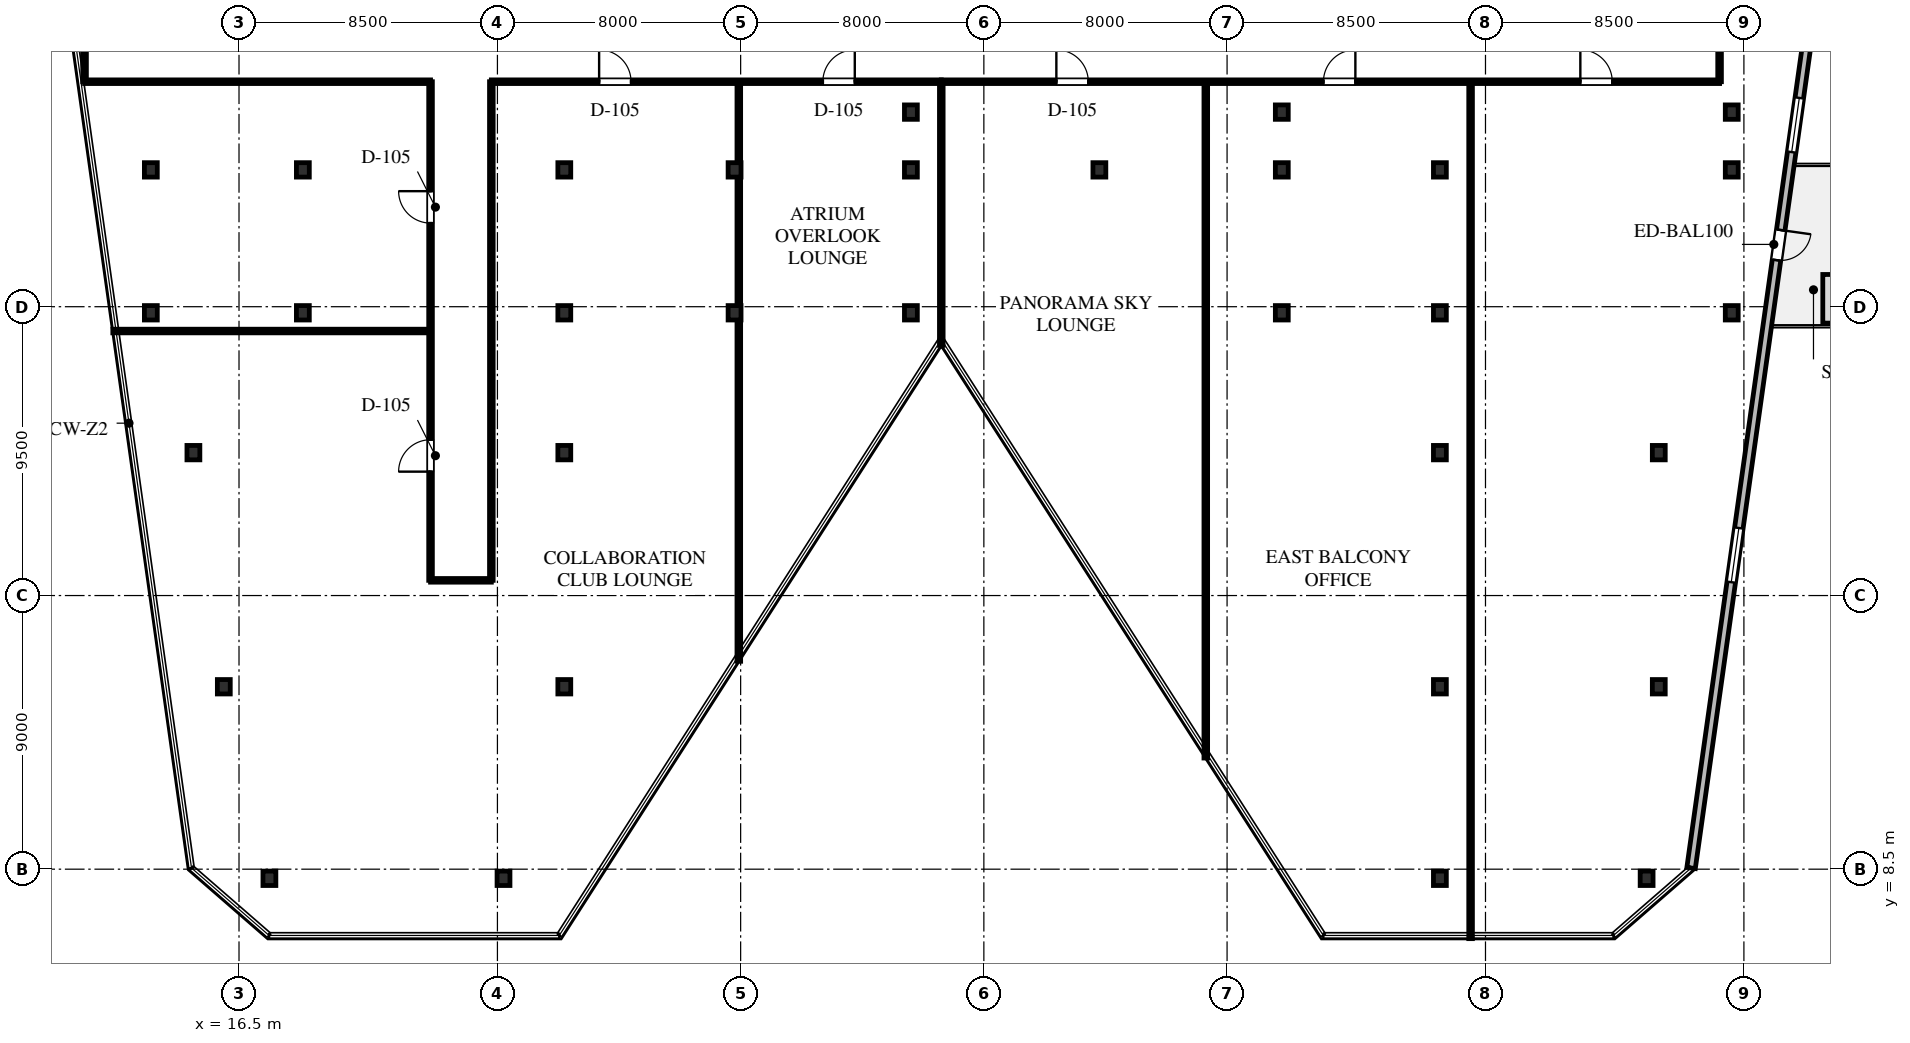
"""IFC4 building model, lengths in metres.
Left out: names, types, materials, properties, quantities, classifications, styles, units other than length and angle.
Written with IfcOpenShell. Run it as: python <this file> out.ifc"""

import sys

from ifc_helpers import new_model, si_unit, direction, frame, frame_2d, origin, origin_2d, place, context, subcontext, project, spatial, rectangle, i_section, extrude, element, fill, save


model = new_model("IFC4")
c1 = context("Model", 3, precision=1e-05, world=origin(), true_north=direction((0.0, 1.0)))
c2 = subcontext(c1, "Body", "Model", "MODEL_VIEW")
j1 = project(units=[si_unit("LENGTHUNIT", "METRE"), si_unit("PLANEANGLEUNIT", "RADIAN")], contexts=[c1])
p1 = place(None, origin())
s1 = spatial("IfcSite", under=j1, at=p1, CompositionType="ELEMENT")
p2 = place(p1, origin())
s2 = spatial("IfcBuilding", under=s1, at=p2, CompositionType="ELEMENT")
p3 = place(p2, frame((0.0, 0.0, 112.0)))
s3 = spatial("IfcBuildingStorey", under=s2, at=p3, CompositionType="ELEMENT", Elevation=112.0)
for number, where, z_axis, x_axis in (
    (1, (17.5, 8.2, 0.0), (0.0, 0.0, 1.0), (1.0, 0.0, 0.0)),
    (2, (13.6, 26.8, 0.0), (0.0, 0.0, 1.0), (1.0, 0.0, 0.0)),
    (3, (18.6, 26.8, 0.0), (0.0, 0.0, 1.0), (1.0, 0.0, 0.0)),
    (4, (27.2, 26.8, 0.0), (0.0, 0.0, 1.0), (1.0, 0.0, 0.0)),
    (5, (32.8, 26.8, 0.0), (0.0, 0.0, 1.0), (1.0, 0.0, 0.0)),
    (6, (38.6, 26.8, 0.0), (0.0, 0.0, 1.0), (1.0, 0.0, 0.0)),
    (7, (50.8, 26.8, 0.0), (0.0, 0.0, 1.0), (1.0, 0.0, 0.0)),
    (8, (56.0, 26.8, 0.0), (0.0, 0.0, 1.0), (1.0, 0.0, 0.0)),
    (9, (65.6, 26.8, 0.0), (0.0, 0.0, 1.0), (1.0, 0.0, 0.0)),
    (10, (13.6, 31.5, 0.0), (0.0, 0.0, 1.0), (1.0, 0.0, 0.0)),
    (11, (18.6, 31.5, 0.0), (0.0, 0.0, 1.0), (1.0, 0.0, 0.0)),
    (12, (27.2, 31.5, 0.0), (0.0, 0.0, 1.0), (1.0, 0.0, 0.0)),
    (13, (25.2, 8.2, 0.0), (0.0, 0.0, 1.0), (1.0, 0.0, 0.0)),
    (14, (32.8, 31.5, 0.0), (0.0, 0.0, 1.0), (1.0, 0.0, 0.0)),
    (15, (38.6, 31.5, 0.0), (0.0, 0.0, 1.0), (1.0, 0.0, 0.0)),
    (16, (44.8, 31.5, 0.0), (0.0, 0.0, 1.0), (1.0, 0.0, 0.0)),
    (17, (50.8, 31.5, 0.0), (0.0, 0.0, 1.0), (1.0, 0.0, 0.0)),
    (18, (56.0, 31.5, 0.0), (0.0, 0.0, 1.0), (1.0, 0.0, 0.0)),
    (19, (65.6, 31.5, 0.0), (0.0, 0.0, 1.0), (1.0, 0.0, 0.0)),
    (20, (56.0, 8.2, 0.0), (0.0, 0.0, 1.0), (1.0, 0.0, 0.0)),
    (21, (62.8, 8.2, 0.0), (0.0, 0.0, 1.0), (1.0, 0.0, 0.0)),
    (22, (16.0, 14.5, 0.0), (0.0, 0.0, 1.0), (1.0, 0.0, 0.0)),
    (23, (27.2, 14.5, 0.0), (0.0, 0.0, 1.0), (1.0, 0.0, 0.0)),
    (24, (56.0, 14.5, 0.0), (0.0, 0.0, 1.0), (1.0, 0.0, 0.0)),
    (25, (63.2, 14.5, 0.0), (0.0, 0.0, 1.0), (1.0, 0.0, 0.0)),
    (26, (15.0, 22.2, 0.0), (0.0, 0.0, 1.0), (1.0, 0.0, 0.0)),
    (27, (27.2, 22.2, 0.0), (0.0, 0.0, 1.0), (1.0, 0.0, 0.0)),
    (28, (56.0, 22.2, 0.0), (0.0, 0.0, 1.0), (1.0, 0.0, 0.0)),
    (29, (63.2, 22.2, 0.0), (0.0, 0.0, 1.0), (1.0, 0.0, 0.0)),
    (30, (38.6, 33.4, 0.0), (0.0, 0.0, 1.0), (1.0, 0.0, 0.0)),
    (31, (50.8, 33.4, 0.0), (0.0, 0.0, 1.0), (1.0, 0.0, 0.0)),
    (32, (65.6, 33.4, 0.0), (0.0, 0.0, 1.0), (1.0, 0.0, 0.0)),
):
    element("IfcColumn", number, at=place(p3, frame(where, z_axis=z_axis, x_axis=x_axis)), inside=s3, PredefinedType="COLUMN", context=c2, shape_type="SweptSolid", body=[
        extrude(i_section(OverallWidth=0.424, OverallDepth=0.474, WebThickness=0.048, FlangeThickness=0.077, FilletRadius=0.03, at=origin_2d()), origin(), (0.0, 0.0, 1.0), 4.0),
    ])
p4 = place(p3, frame((68.375, 37.8, 0.0), z_axis=(0.0, 0.0, 1.0), x_axis=(-0.13917001236, -0.990268502811, 0.0)))
e33 = element("IfcWall", 33, at=p4, inside=s3, PredefinedType="STANDARD", context=c2, shape_type="SweptSolid", body=[
    extrude(rectangle(XDim=29.549, YDim=0.28, at=frame_2d((14.774, 0.0))), origin(), (0.0, 0.0, 1.0), 3.75),
])
p5 = place(p4, frame((8.36, 0.0, 0.0)))
e34 = element("IfcOpeningElement", 34, at=p5, cuts=e33, PredefinedType="OPENING", context=c2, shape_type="SweptSolid", body=[
    extrude(rectangle(XDim=1.0, YDim=2.15, at=frame_2d((0.5, 1.075))), frame((0.0, 0.15, 0.0), z_axis=(0.0, -1.0, 0.0), x_axis=(1.0, 0.0, 0.0)), (0.0, 0.0, 1.0), 0.3),
])
p6 = place(p4, frame((3.971, 0.0, 0.65)))
e35 = element("IfcOpeningElement", 35, at=p6, cuts=e33, PredefinedType="OPENING", context=c2, shape_type="SweptSolid", body=[
    extrude(rectangle(XDim=1.8, YDim=2.1, at=frame_2d((0.9, 1.05))), frame((0.0, 0.15, 0.0), z_axis=(0.0, -1.0, 0.0), x_axis=(1.0, 0.0, 0.0)), (0.0, 0.0, 1.0), 0.3),
])
p7 = place(p4, frame((18.256, 0.0, 0.65)))
e36 = element("IfcOpeningElement", 36, at=p7, cuts=e33, PredefinedType="OPENING", context=c2, shape_type="SweptSolid", body=[
    extrude(rectangle(XDim=1.8, YDim=2.1, at=frame_2d((0.9, 1.05))), frame((0.0, 0.15, 0.0), z_axis=(0.0, -1.0, 0.0), x_axis=(1.0, 0.0, 0.0)), (0.0, 0.0, 1.0), 0.3),
])
p8 = place(p3, frame((11.42, 34.4, 0.0), z_axis=(0.0, 0.0, 1.0), x_axis=(1.0, 0.0, 0.0)))
e37 = element("IfcWall", 37, at=p8, inside=s3, PredefinedType="PARTITIONING", context=c2, shape_type="SweptSolid", body=[
    extrude(rectangle(XDim=11.38, YDim=0.12, at=frame_2d((5.69, 0.0))), origin(), (0.0, 0.0, 1.0), 2.894),
])
p9 = place(p3, frame((24.8, 34.4, 0.0), z_axis=(0.0, 0.0, 1.0), x_axis=(1.0, 0.0, 0.0)))
e38 = element("IfcWall", 38, at=p9, inside=s3, PredefinedType="PARTITIONING", context=c2, shape_type="SweptSolid", body=[
    extrude(rectangle(XDim=14.8, YDim=0.12, at=frame_2d((7.4, 0.0))), origin(), (0.0, 0.0, 1.0), 2.894),
])
p10 = place(p9, frame((3.545, 0.0, 0.0)))
e39 = element("IfcOpeningElement", 39, at=p10, cuts=e38, PredefinedType="OPENING", context=c2, shape_type="SweptSolid", body=[
    extrude(rectangle(XDim=1.05, YDim=2.2, at=frame_2d((0.525, 1.1))), frame((0.0, 0.07, 0.0), z_axis=(0.0, -1.0, 0.0), x_axis=(1.0, 0.0, 0.0)), (0.0, 0.0, 1.0), 0.14),
])
p11 = place(p9, frame((10.904, 0.0, 0.0)))
e40 = element("IfcOpeningElement", 40, at=p11, cuts=e38, PredefinedType="OPENING", context=c2, shape_type="SweptSolid", body=[
    extrude(rectangle(XDim=1.05, YDim=2.2, at=frame_2d((0.525, 1.1))), frame((0.0, 0.07, 0.0), z_axis=(0.0, -1.0, 0.0), x_axis=(1.0, 0.0, 0.0)), (0.0, 0.0, 1.0), 0.14),
])
p12 = place(p3, frame((39.6, 34.4, 0.0), z_axis=(0.0, 0.0, 1.0), x_axis=(1.0, 0.0, 0.0)))
e41 = element("IfcWall", 41, at=p12, inside=s3, PredefinedType="PARTITIONING", context=c2, shape_type="SweptSolid", body=[
    extrude(rectangle(XDim=25.6, YDim=0.12, at=frame_2d((12.8, 0.0))), origin(), (0.0, 0.0, 1.0), 2.894),
])
p13 = place(p12, frame((3.785, 0.0, 0.0)))
e42 = element("IfcOpeningElement", 42, at=p13, cuts=e41, PredefinedType="OPENING", context=c2, shape_type="SweptSolid", body=[
    extrude(rectangle(XDim=1.05, YDim=2.2, at=frame_2d((0.525, 1.1))), frame((0.0, 0.07, 0.0), z_axis=(0.0, -1.0, 0.0), x_axis=(1.0, 0.0, 0.0)), (0.0, 0.0, 1.0), 0.14),
])
p14 = place(p12, frame((12.57, 0.0, 0.0)))
e43 = element("IfcOpeningElement", 43, at=p14, cuts=e41, PredefinedType="OPENING", context=c2, shape_type="SweptSolid", body=[
    extrude(rectangle(XDim=1.05, YDim=2.2, at=frame_2d((0.525, 1.1))), frame((0.0, 0.07, 0.0), z_axis=(0.0, -1.0, 0.0), x_axis=(1.0, 0.0, 0.0)), (0.0, 0.0, 1.0), 0.14),
])
p15 = place(p12, frame((21.02, 0.0, 0.0)))
e44 = element("IfcOpeningElement", 44, at=p15, cuts=e41, PredefinedType="OPENING", context=c2, shape_type="SweptSolid", body=[
    extrude(rectangle(XDim=1.05, YDim=2.2, at=frame_2d((0.525, 1.1))), frame((0.0, 0.07, 0.0), z_axis=(0.0, -1.0, 0.0), x_axis=(1.0, 0.0, 0.0)), (0.0, 0.0, 1.0), 0.14),
])
p16 = place(p3, frame((11.42, 34.4, 0.0), z_axis=(0.0, 0.0, 1.0), x_axis=(0.0, 1.0, 0.0)))
e45 = element("IfcWall", 45, at=p16, inside=s3, PredefinedType="PARTITIONING", context=c2, shape_type="SweptSolid", body=[
    extrude(rectangle(XDim=3.65, YDim=0.12, at=frame_2d((1.825, 0.0))), origin(), (0.0, 0.0, 1.0), 3.75),
])
p17 = place(p3, frame((65.2, 34.4, 0.0), z_axis=(0.0, 0.0, 1.0), x_axis=(0.0, 1.0, 0.0)))
e46 = element("IfcWall", 46, at=p17, inside=s3, PredefinedType="PARTITIONING", context=c2, shape_type="SweptSolid", body=[
    extrude(rectangle(XDim=3.267, YDim=0.12, at=frame_2d((1.634, 0.0))), origin(), (0.0, 0.0, 1.0), 2.894),
])
p18 = place(p3, frame((22.8, 18.0, 0.0), z_axis=(0.0, 0.0, 1.0), x_axis=(0.0, 1.0, 0.0)))
e47 = element("IfcWall", 47, at=p18, inside=s3, PredefinedType="PARTITIONING", context=c2, shape_type="SweptSolid", body=[
    extrude(rectangle(XDim=16.4, YDim=0.12, at=frame_2d((8.2, 0.0))), origin(), (0.0, 0.0, 1.0), 2.894),
])
p19 = place(p18, frame((3.575, 0.0, 0.0)))
e48 = element("IfcOpeningElement", 48, at=p19, cuts=e47, PredefinedType="OPENING", context=c2, shape_type="SweptSolid", body=[
    extrude(rectangle(XDim=1.05, YDim=2.2, at=frame_2d((0.525, 1.1))), frame((0.0, 0.07, 0.0), z_axis=(0.0, -1.0, 0.0), x_axis=(1.0, 0.0, 0.0)), (0.0, 0.0, 1.0), 0.14),
])
p20 = place(p18, frame((11.75, 0.0, 0.0)))
e49 = element("IfcOpeningElement", 49, at=p20, cuts=e47, PredefinedType="OPENING", context=c2, shape_type="SweptSolid", body=[
    extrude(rectangle(XDim=1.05, YDim=2.2, at=frame_2d((0.525, 1.1))), frame((0.0, 0.07, 0.0), z_axis=(0.0, -1.0, 0.0), x_axis=(1.0, 0.0, 0.0)), (0.0, 0.0, 1.0), 0.14),
])
p21 = place(p3, frame((24.8, 18.0, 0.0), z_axis=(0.0, 0.0, 1.0), x_axis=(0.0, 1.0, 0.0)))
e50 = element("IfcWall", 50, at=p21, inside=s3, PredefinedType="PARTITIONING", context=c2, shape_type="SweptSolid", body=[
    extrude(rectangle(XDim=16.4, YDim=0.12, at=frame_2d((8.2, 0.0))), origin(), (0.0, 0.0, 1.0), 2.894),
])
p22 = place(p3, frame((22.8, 18.0, 0.0), z_axis=(0.0, 0.0, 1.0), x_axis=(1.0, 0.0, 0.0)))
e51 = element("IfcWall", 51, at=p22, inside=s3, PredefinedType="PARTITIONING", context=c2, shape_type="SweptSolid", body=[
    extrude(rectangle(XDim=2.0, YDim=0.12, at=frame_2d((1.0, 0.0))), origin(), (0.0, 0.0, 1.0), 3.293),
])
p23 = place(p3, frame((12.349, 26.2, 0.0), z_axis=(0.0, 0.0, 1.0), x_axis=(1.0, 0.0, 0.0)))
e52 = element("IfcWall", 52, at=p23, inside=s3, PredefinedType="PARTITIONING", context=c2, shape_type="SweptSolid", body=[
    extrude(rectangle(XDim=10.383, YDim=0.12, at=frame_2d((5.191, 0.0))), origin(), (0.0, 0.0, 1.0), 3.142),
])
p24 = place(p3, frame((39.6, 25.728, 0.0), z_axis=(0.0, 0.0, 1.0), x_axis=(0.0, 1.0, 0.0)))
e53 = element("IfcWall", 53, at=p24, inside=s3, PredefinedType="PARTITIONING", context=c2, shape_type="SweptSolid", body=[
    extrude(rectangle(XDim=8.672, YDim=0.12, at=frame_2d((4.336, 0.0))), origin(), (0.0, 0.0, 1.0), 2.894),
])
p25 = place(p3, frame((32.94, 15.338, 0.0), z_axis=(0.0, 0.0, 1.0), x_axis=(0.0, 1.0, 0.0)))
e54 = element("IfcWall", 54, at=p25, inside=s3, PredefinedType="PARTITIONING", context=c2, shape_type="SweptSolid", body=[
    extrude(rectangle(XDim=18.994, YDim=0.12, at=frame_2d((9.497, 0.0))), origin(), (0.0, 0.0, 1.0), 2.894),
])
p26 = place(p3, frame((48.3, 12.156, 0.0), z_axis=(0.0, 0.0, 1.0), x_axis=(0.0, 1.0, 0.0)))
e55 = element("IfcWall", 55, at=p26, inside=s3, PredefinedType="PARTITIONING", context=c2, shape_type="SweptSolid", body=[
    extrude(rectangle(XDim=22.176, YDim=0.12, at=frame_2d((11.088, 0.0))), origin(), (0.0, 0.0, 1.0), 2.894),
])
p27 = place(p3, frame((57.01, 6.215, 0.0), z_axis=(0.0, 0.0, 1.0), x_axis=(0.0, 1.0, 0.0)))
e56 = element("IfcWall", 56, at=p27, inside=s3, PredefinedType="PARTITIONING", context=c2, shape_type="SweptSolid", body=[
    extrude(rectangle(XDim=28.117, YDim=0.12, at=frame_2d((14.059, 0.0))), origin(), (0.0, 0.0, 1.0), 2.894),
])
p28 = place(p5, origin())
e57 = element("IfcDoor", 57, at=p28, inside=s3, OperationType="SINGLE_SWING_LEFT", PredefinedType="DOOR", context=c2, shape_type="SweptSolid", body=[
    extrude(rectangle(XDim=1.0, YDim=2.15, at=frame_2d((0.5, 1.075))), frame((0.0, 0.025, 0.0), z_axis=(0.0, -1.0, 0.0), x_axis=(1.0, 0.0, 0.0)), (0.0, 0.0, 1.0), 0.05),
])
fill(e34, e57)
p29 = place(p6, origin())
e58 = element("IfcWindow", 58, at=p29, inside=s3, PartitioningType="SINGLE_PANEL", PredefinedType="WINDOW", context=c2, shape_type="SweptSolid", body=[
    extrude(rectangle(XDim=1.8, YDim=2.1, at=frame_2d((0.9, 1.05))), frame((0.0, 0.03, 0.0), z_axis=(0.0, -1.0, 0.0), x_axis=(1.0, 0.0, 0.0)), (0.0, 0.0, 1.0), 0.06),
])
fill(e35, e58)
p30 = place(p7, origin())
e59 = element("IfcWindow", 59, at=p30, inside=s3, PartitioningType="SINGLE_PANEL", PredefinedType="WINDOW", context=c2, shape_type="SweptSolid", body=[
    extrude(rectangle(XDim=1.8, YDim=2.1, at=frame_2d((0.9, 1.05))), frame((0.0, 0.03, 0.0), z_axis=(0.0, -1.0, 0.0), x_axis=(1.0, 0.0, 0.0)), (0.0, 0.0, 1.0), 0.06),
])
fill(e36, e59)
p31 = place(p19, origin())
e60 = element("IfcDoor", 60, at=p31, inside=s3, OperationType="SINGLE_SWING_LEFT", PredefinedType="DOOR", context=c2, shape_type="SweptSolid", body=[
    extrude(rectangle(XDim=1.05, YDim=2.2, at=frame_2d((0.525, 1.1))), frame((0.0, 0.025, 0.0), z_axis=(0.0, -1.0, 0.0), x_axis=(1.0, 0.0, 0.0)), (0.0, 0.0, 1.0), 0.05),
])
fill(e48, e60)
p32 = place(p20, origin())
e61 = element("IfcDoor", 61, at=p32, inside=s3, OperationType="SINGLE_SWING_RIGHT", PredefinedType="DOOR", context=c2, shape_type="SweptSolid", body=[
    extrude(rectangle(XDim=1.05, YDim=2.2, at=frame_2d((0.525, 1.1))), frame((0.0, 0.025, 0.0), z_axis=(0.0, -1.0, 0.0), x_axis=(1.0, 0.0, 0.0)), (0.0, 0.0, 1.0), 0.05),
])
fill(e49, e61)
p33 = place(p10, origin())
e62 = element("IfcDoor", 62, at=p33, inside=s3, OperationType="SINGLE_SWING_LEFT", PredefinedType="DOOR", context=c2, shape_type="SweptSolid", body=[
    extrude(rectangle(XDim=1.05, YDim=2.2, at=frame_2d((0.525, 1.1))), frame((0.0, 0.025, 0.0), z_axis=(0.0, -1.0, 0.0), x_axis=(1.0, 0.0, 0.0)), (0.0, 0.0, 1.0), 0.05),
])
fill(e39, e62)
p34 = place(p11, origin())
e63 = element("IfcDoor", 63, at=p34, inside=s3, OperationType="SINGLE_SWING_RIGHT", PredefinedType="DOOR", context=c2, shape_type="SweptSolid", body=[
    extrude(rectangle(XDim=1.05, YDim=2.2, at=frame_2d((0.525, 1.1))), frame((0.0, 0.025, 0.0), z_axis=(0.0, -1.0, 0.0), x_axis=(1.0, 0.0, 0.0)), (0.0, 0.0, 1.0), 0.05),
])
fill(e40, e63)
p35 = place(p13, origin())
e64 = element("IfcDoor", 64, at=p35, inside=s3, OperationType="SINGLE_SWING_LEFT", PredefinedType="DOOR", context=c2, shape_type="SweptSolid", body=[
    extrude(rectangle(XDim=1.05, YDim=2.2, at=frame_2d((0.525, 1.1))), frame((0.0, 0.025, 0.0), z_axis=(0.0, -1.0, 0.0), x_axis=(1.0, 0.0, 0.0)), (0.0, 0.0, 1.0), 0.05),
])
fill(e42, e64)
p36 = place(p14, origin())
e65 = element("IfcDoor", 65, at=p36, inside=s3, OperationType="SINGLE_SWING_RIGHT", PredefinedType="DOOR", context=c2, shape_type="SweptSolid", body=[
    extrude(rectangle(XDim=1.05, YDim=2.2, at=frame_2d((0.525, 1.1))), frame((0.0, 0.025, 0.0), z_axis=(0.0, -1.0, 0.0), x_axis=(1.0, 0.0, 0.0)), (0.0, 0.0, 1.0), 0.05),
])
fill(e43, e65)
p37 = place(p15, origin())
e66 = element("IfcDoor", 66, at=p37, inside=s3, OperationType="SINGLE_SWING_LEFT", PredefinedType="DOOR", context=c2, shape_type="SweptSolid", body=[
    extrude(rectangle(XDim=1.05, YDim=2.2, at=frame_2d((0.525, 1.1))), frame((0.0, 0.025, 0.0), z_axis=(0.0, -1.0, 0.0), x_axis=(1.0, 0.0, 0.0)), (0.0, 0.0, 1.0), 0.05),
])
fill(e44, e66)
save(model, sys.argv[1])
